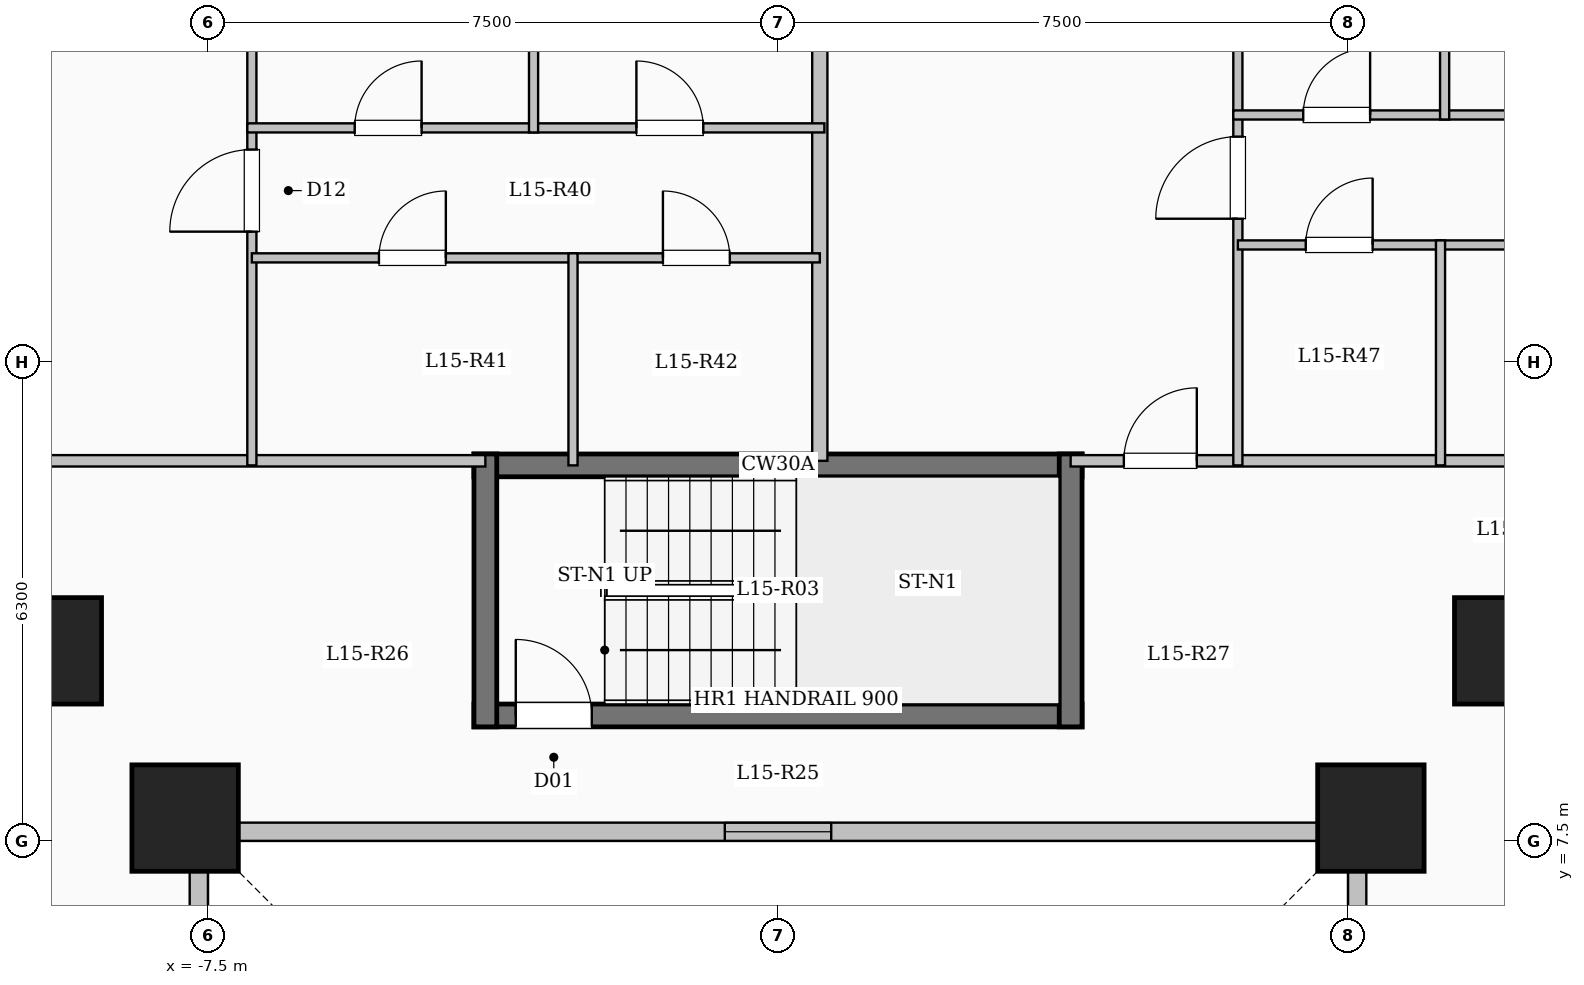
"""IFC4 building model, lengths in metres.
Left out: names, types, materials, properties, quantities, classifications, styles, units other than length and angle.
Written with IfcOpenShell. Run it as: python <this file> out.ifc"""

import sys

from ifc_helpers import new_model, si_unit, direction, frame, frame_2d, origin, origin_2d, place, context, subcontext, project, spatial, rectangle, extrude, element, fill, save


model = new_model("IFC4")
c1 = context("Model", 3, precision=1e-05, world=origin(), true_north=direction((0.0, 1.0)))
c2 = subcontext(c1, "Body", "Model", "MODEL_VIEW")
j1 = project(units=[si_unit("LENGTHUNIT", "METRE"), si_unit("PLANEANGLEUNIT", "RADIAN")], contexts=[c1])
p1 = place(None, origin())
s1 = spatial("IfcSite", under=j1, at=p1, CompositionType="ELEMENT")
p2 = place(p1, origin())
s2 = spatial("IfcBuilding", under=s1, at=p2, CompositionType="ELEMENT")
p3 = place(p2, frame((0.0, 0.0, 57.5)))
s3 = spatial("IfcBuildingStorey", under=s2, at=p3, CompositionType="ELEMENT", Elevation=57.5)
for number, where, z_axis, x_axis in (
    (1, (-7.8, 7.8, 0.0), (0.0, 0.0, 1.0), (1.0, 0.0, 0.0)),
    (2, (7.8, 7.8, 0.0), (0.0, 0.0, 1.0), (1.0, 0.0, 0.0)),
    (3, (-9.6, 10.0, 0.0), (0.0, 0.0, 1.0), (1.0, 0.0, 0.0)),
    (4, (9.6, 10.0, 0.0), (0.0, 0.0, 1.0), (1.0, 0.0, 0.0)),
):
    element("IfcColumn", number, at=place(p3, frame(where, z_axis=z_axis, x_axis=x_axis)), inside=s3, PredefinedType="COLUMN", context=c2, shape_type="SweptSolid", body=[
        extrude(rectangle(XDim=1.4, YDim=1.4, at=origin_2d()), origin(), (0.0, 0.0, 1.0), 3.35),
    ])
p4 = place(p3, frame((7.62, -7.62, 0.0), z_axis=(0.0, 0.0, 1.0), x_axis=(0.0, 1.0, 0.0)))
e5 = element("IfcWall", 5, at=p4, inside=s3, PredefinedType="SOLIDWALL", context=c2, shape_type="SweptSolid", body=[
    extrude(rectangle(XDim=15.24, YDim=0.24, at=frame_2d((7.62, 0.0))), origin(), (0.0, 0.0, 1.0), 3.1),
])
p5 = place(p4, frame((6.92, 0.0, 0.95)))
e6 = element("IfcOpeningElement", 6, at=p5, cuts=e5, PredefinedType="OPENING", context=c2, shape_type="SweptSolid", body=[
    extrude(rectangle(XDim=1.4, YDim=1.5, at=frame_2d((0.7, 0.75))), frame((0.0, 0.13, 0.0), z_axis=(0.0, -1.0, 0.0), x_axis=(1.0, 0.0, 0.0)), (0.0, 0.0, 1.0), 0.26),
])
p6 = place(p3, frame((7.62, 7.62, 0.0), z_axis=(0.0, 0.0, 1.0), x_axis=(-1.0, 0.0, 0.0)))
e7 = element("IfcWall", 7, at=p6, inside=s3, PredefinedType="SOLIDWALL", context=c2, shape_type="SweptSolid", body=[
    extrude(rectangle(XDim=15.24, YDim=0.24, at=frame_2d((7.62, 0.0))), origin(), (0.0, 0.0, 1.0), 3.1),
])
p7 = place(p6, frame((6.92, 0.0, 0.95)))
e8 = element("IfcOpeningElement", 8, at=p7, cuts=e7, PredefinedType="OPENING", context=c2, shape_type="SweptSolid", body=[
    extrude(rectangle(XDim=1.4, YDim=1.5, at=frame_2d((0.7, 0.75))), frame((0.0, 0.13, 0.0), z_axis=(0.0, -1.0, 0.0), x_axis=(1.0, 0.0, 0.0)), (0.0, 0.0, 1.0), 0.26),
])
p8 = place(p3, frame((-7.62, 7.62, 0.0), z_axis=(0.0, 0.0, 1.0), x_axis=(0.0, -1.0, 0.0)))
e9 = element("IfcWall", 9, at=p8, inside=s3, PredefinedType="SOLIDWALL", context=c2, shape_type="SweptSolid", body=[
    extrude(rectangle(XDim=15.24, YDim=0.24, at=frame_2d((7.62, 0.0))), origin(), (0.0, 0.0, 1.0), 3.1),
])
p9 = place(p8, frame((6.92, 0.0, 0.95)))
e10 = element("IfcOpeningElement", 10, at=p9, cuts=e9, PredefinedType="OPENING", context=c2, shape_type="SweptSolid", body=[
    extrude(rectangle(XDim=1.4, YDim=1.5, at=frame_2d((0.7, 0.75))), frame((0.0, 0.13, 0.0), z_axis=(0.0, -1.0, 0.0), x_axis=(1.0, 0.0, 0.0)), (0.0, 0.0, 1.0), 0.26),
])
p10 = place(p3, frame((-4.0, 12.44, 0.0), z_axis=(0.0, 0.0, 1.0), x_axis=(1.0, 0.0, 0.0)))
e11 = element("IfcWall", 11, at=p10, inside=s3, PredefinedType="SHEAR", context=c2, shape_type="SweptSolid", body=[
    extrude(rectangle(XDim=8.0, YDim=0.3, at=frame_2d((4.0, 0.0))), origin(), (0.0, 0.0, 1.0), 3.35),
])
p11 = place(p3, frame((-4.0, 9.15, 0.0), z_axis=(0.0, 0.0, 1.0), x_axis=(1.0, 0.0, 0.0)))
e12 = element("IfcWall", 12, at=p11, inside=s3, PredefinedType="SHEAR", context=c2, shape_type="SweptSolid", body=[
    extrude(rectangle(XDim=8.0, YDim=0.3, at=frame_2d((4.0, 0.0))), origin(), (0.0, 0.0, 1.0), 3.35),
])
p12 = place(p11, frame((0.55, 0.0, 0.0)))
e13 = element("IfcOpeningElement", 13, at=p12, cuts=e12, PredefinedType="OPENING", context=c2, shape_type="SweptSolid", body=[
    extrude(rectangle(XDim=1.0, YDim=2.15, at=frame_2d((0.5, 1.075))), frame((0.0, 0.16, 0.0), z_axis=(0.0, -1.0, 0.0), x_axis=(1.0, 0.0, 0.0)), (0.0, 0.0, 1.0), 0.32),
])
for number, where, z_axis, x_axis in (
    (14, (-3.85, 9.0, 0.0), (0.0, 0.0, 1.0), (0.0, 1.0, 0.0)),
    (15, (3.85, 9.0, 0.0), (0.0, 0.0, 1.0), (0.0, 1.0, 0.0)),
):
    element("IfcWall", number, at=place(p3, frame(where, z_axis=z_axis, x_axis=x_axis)), inside=s3, PredefinedType="SHEAR", context=c2, shape_type="SweptSolid", body=[
        extrude(rectangle(XDim=3.59, YDim=0.3, at=frame_2d((1.795, 0.0))), origin(), (0.0, 0.0, 1.0), 3.35),
    ])
p13 = place(p3, frame((-22.55, 12.5, 0.0), z_axis=(0.0, 0.0, 1.0), x_axis=(1.0, 0.0, 0.0)))
e16 = element("IfcWall", 16, at=p13, inside=s3, PredefinedType="PARTITIONING", context=c2, shape_type="SweptSolid", body=[
    extrude(rectangle(XDim=18.7, YDim=0.15, at=frame_2d((9.35, 0.0))), origin(), (0.0, 0.0, 1.0), 3.1),
])
p14 = place(p13, frame((0.7, 0.0, 0.0)))
e17 = element("IfcOpeningElement", 17, at=p14, cuts=e16, PredefinedType="OPENING", context=c2, shape_type="SweptSolid", body=[
    extrude(rectangle(XDim=0.96, YDim=2.15, at=frame_2d((0.48, 1.075))), frame((0.0, 0.085, 0.0), z_axis=(0.0, -1.0, 0.0), x_axis=(1.0, 0.0, 0.0)), (0.0, 0.0, 1.0), 0.17),
])
p15 = place(p13, frame((11.326, 0.0, 0.0)))
e18 = element("IfcOpeningElement", 18, at=p15, cuts=e16, PredefinedType="OPENING", context=c2, shape_type="SweptSolid", body=[
    extrude(rectangle(XDim=0.96, YDim=2.15, at=frame_2d((0.48, 1.075))), frame((0.0, 0.085, 0.0), z_axis=(0.0, -1.0, 0.0), x_axis=(1.0, 0.0, 0.0)), (0.0, 0.0, 1.0), 0.17),
])
p16 = place(p3, frame((3.85, 12.5, 0.0), z_axis=(0.0, 0.0, 1.0), x_axis=(1.0, 0.0, 0.0)))
e19 = element("IfcWall", 19, at=p16, inside=s3, PredefinedType="PARTITIONING", context=c2, shape_type="SweptSolid", body=[
    extrude(rectangle(XDim=18.7, YDim=0.15, at=frame_2d((9.35, 0.0))), origin(), (0.0, 0.0, 1.0), 3.1),
])
p17 = place(p16, frame((0.7, 0.0, 0.0)))
e20 = element("IfcOpeningElement", 20, at=p17, cuts=e19, PredefinedType="OPENING", context=c2, shape_type="SweptSolid", body=[
    extrude(rectangle(XDim=0.96, YDim=2.15, at=frame_2d((0.48, 1.075))), frame((0.0, 0.085, 0.0), z_axis=(0.0, -1.0, 0.0), x_axis=(1.0, 0.0, 0.0)), (0.0, 0.0, 1.0), 0.17),
])
p18 = place(p16, frame((8.4, 0.0, 0.0)))
e21 = element("IfcOpeningElement", 21, at=p18, cuts=e19, PredefinedType="OPENING", context=c2, shape_type="SweptSolid", body=[
    extrude(rectangle(XDim=0.96, YDim=2.15, at=frame_2d((0.48, 1.075))), frame((0.0, 0.085, 0.0), z_axis=(0.0, -1.0, 0.0), x_axis=(1.0, 0.0, 0.0)), (0.0, 0.0, 1.0), 0.17),
])
p19 = place(p3, frame((0.55, 12.5, 0.0), z_axis=(0.0, 0.0, 1.0), x_axis=(0.0, 1.0, 0.0)))
e22 = element("IfcWall", 22, at=p19, inside=s3, PredefinedType="SOLIDWALL", context=c2, shape_type="SweptSolid", body=[
    extrude(rectangle(XDim=12.58, YDim=0.2, at=frame_2d((6.29, 0.0))), origin(), (0.0, 0.0, 1.0), 3.1),
])
p20 = place(p3, frame((-6.922, 12.44, 0.0), z_axis=(0.0, 0.0, 1.0), x_axis=(0.0, 1.0, 0.0)))
e23 = element("IfcWall", 23, at=p20, inside=s3, PredefinedType="PARTITIONING", context=c2, shape_type="SweptSolid", body=[
    extrude(rectangle(XDim=12.166, YDim=0.12, at=frame_2d((6.083, 0.0))), origin(), (0.0, 0.0, 1.0), 3.1),
])
p21 = place(p20, frame((3.075, 0.0, 0.0)))
e24 = element("IfcOpeningElement", 24, at=p21, cuts=e23, PredefinedType="OPENING", context=c2, shape_type="SweptSolid", body=[
    extrude(rectangle(XDim=1.08, YDim=2.15, at=frame_2d((0.54, 1.075))), frame((0.0, 0.07, 0.0), z_axis=(0.0, -1.0, 0.0), x_axis=(1.0, 0.0, 0.0)), (0.0, 0.0, 1.0), 0.14),
])
p22 = place(p3, frame((-6.922, 15.17, 0.0), z_axis=(0.0, 0.0, 1.0), x_axis=(1.0, 0.0, 0.0)))
e25 = element("IfcWall", 25, at=p22, inside=s3, PredefinedType="PARTITIONING", context=c2, shape_type="SweptSolid", body=[
    extrude(rectangle(XDim=4.225, YDim=0.12, at=frame_2d((2.113, 0.0))), origin(), (0.0, 0.0, 1.0), 3.1),
])
p23 = place(p22, frame((1.672, 0.0, 0.0)))
e26 = element("IfcOpeningElement", 26, at=p23, cuts=e25, PredefinedType="OPENING", context=c2, shape_type="SweptSolid", body=[
    extrude(rectangle(XDim=0.88, YDim=2.1, at=frame_2d((0.44, 1.05))), frame((0.0, 0.07, 0.0), z_axis=(0.0, -1.0, 0.0), x_axis=(1.0, 0.0, 0.0)), (0.0, 0.0, 1.0), 0.14),
])
p24 = place(p3, frame((-2.697, 15.17, 0.0), z_axis=(0.0, 0.0, 1.0), x_axis=(1.0, 0.0, 0.0)))
e27 = element("IfcWall", 27, at=p24, inside=s3, PredefinedType="PARTITIONING", context=c2, shape_type="SweptSolid", body=[
    extrude(rectangle(XDim=3.247, YDim=0.12, at=frame_2d((1.624, 0.0))), origin(), (0.0, 0.0, 1.0), 3.1),
])
p25 = place(p24, frame((1.183, 0.0, 0.0)))
e28 = element("IfcOpeningElement", 28, at=p25, cuts=e27, PredefinedType="OPENING", context=c2, shape_type="SweptSolid", body=[
    extrude(rectangle(XDim=0.88, YDim=2.1, at=frame_2d((0.44, 1.05))), frame((0.0, 0.07, 0.0), z_axis=(0.0, -1.0, 0.0), x_axis=(1.0, 0.0, 0.0)), (0.0, 0.0, 1.0), 0.14),
])
p26 = place(p3, frame((-6.982, 16.88, 0.0), z_axis=(0.0, 0.0, 1.0), x_axis=(1.0, 0.0, 0.0)))
e29 = element("IfcWall", 29, at=p26, inside=s3, PredefinedType="PARTITIONING", context=c2, shape_type="SweptSolid", body=[
    extrude(rectangle(XDim=7.592, YDim=0.12, at=frame_2d((3.796, 0.0))), origin(), (0.0, 0.0, 1.0), 3.1),
])
p27 = place(p26, frame((1.413, 0.0, 0.0)))
e30 = element("IfcOpeningElement", 30, at=p27, cuts=e29, PredefinedType="OPENING", context=c2, shape_type="SweptSolid", body=[
    extrude(rectangle(XDim=0.88, YDim=2.1, at=frame_2d((0.44, 1.05))), frame((0.0, 0.07, 0.0), z_axis=(0.0, -1.0, 0.0), x_axis=(1.0, 0.0, 0.0)), (0.0, 0.0, 1.0), 0.14),
])
p28 = place(p26, frame((5.119, 0.0, 0.0)))
e31 = element("IfcOpeningElement", 31, at=p28, cuts=e29, PredefinedType="OPENING", context=c2, shape_type="SweptSolid", body=[
    extrude(rectangle(XDim=0.88, YDim=2.1, at=frame_2d((0.44, 1.05))), frame((0.0, 0.07, 0.0), z_axis=(0.0, -1.0, 0.0), x_axis=(1.0, 0.0, 0.0)), (0.0, 0.0, 1.0), 0.14),
])
p29 = place(p3, frame((-2.697, 12.44, 0.0), z_axis=(0.0, 0.0, 1.0), x_axis=(0.0, 1.0, 0.0)))
e32 = element("IfcWall", 32, at=p29, inside=s3, PredefinedType="PARTITIONING", context=c2, shape_type="SweptSolid", body=[
    extrude(rectangle(XDim=2.79, YDim=0.12, at=frame_2d((1.395, 0.0))), origin(), (0.0, 0.0, 1.0), 3.1),
])
p30 = place(p3, frame((-3.216, 16.82, 0.0), z_axis=(0.0, 0.0, 1.0), x_axis=(0.0, 1.0, 0.0)))
e33 = element("IfcWall", 33, at=p30, inside=s3, PredefinedType="PARTITIONING", context=c2, shape_type="SweptSolid", body=[
    extrude(rectangle(XDim=8.26, YDim=0.12, at=frame_2d((4.13, 0.0))), origin(), (0.0, 0.0, 1.0), 3.1),
])
p31 = place(p3, frame((6.05, 12.44, 0.0), z_axis=(0.0, 0.0, 1.0), x_axis=(0.0, 1.0, 0.0)))
e34 = element("IfcWall", 34, at=p31, inside=s3, PredefinedType="PARTITIONING", context=c2, shape_type="SweptSolid", body=[
    extrude(rectangle(XDim=12.381, YDim=0.12, at=frame_2d((6.19, 0.0))), origin(), (0.0, 0.0, 1.0), 3.1),
])
p32 = place(p31, frame((3.245, 0.0, 0.0)))
e35 = element("IfcOpeningElement", 35, at=p32, cuts=e34, PredefinedType="OPENING", context=c2, shape_type="SweptSolid", body=[
    extrude(rectangle(XDim=1.08, YDim=2.15, at=frame_2d((0.54, 1.075))), frame((0.0, 0.07, 0.0), z_axis=(0.0, -1.0, 0.0), x_axis=(1.0, 0.0, 0.0)), (0.0, 0.0, 1.0), 0.14),
])
p33 = place(p3, frame((6.05, 15.34, 0.0), z_axis=(0.0, 0.0, 1.0), x_axis=(1.0, 0.0, 0.0)))
e36 = element("IfcWall", 36, at=p33, inside=s3, PredefinedType="PARTITIONING", context=c2, shape_type="SweptSolid", body=[
    extrude(rectangle(XDim=2.666, YDim=0.12, at=frame_2d((1.333, 0.0))), origin(), (0.0, 0.0, 1.0), 3.1),
])
p34 = place(p33, frame((0.893, 0.0, 0.0)))
e37 = element("IfcOpeningElement", 37, at=p34, cuts=e36, PredefinedType="OPENING", context=c2, shape_type="SweptSolid", body=[
    extrude(rectangle(XDim=0.88, YDim=2.1, at=frame_2d((0.44, 1.05))), frame((0.0, 0.07, 0.0), z_axis=(0.0, -1.0, 0.0), x_axis=(1.0, 0.0, 0.0)), (0.0, 0.0, 1.0), 0.14),
])
p35 = place(p3, frame((8.716, 15.34, 0.0), z_axis=(0.0, 0.0, 1.0), x_axis=(1.0, 0.0, 0.0)))
e38 = element("IfcWall", 38, at=p35, inside=s3, PredefinedType="PARTITIONING", context=c2, shape_type="SweptSolid", body=[
    extrude(rectangle(XDim=2.834, YDim=0.12, at=frame_2d((1.417, 0.0))), origin(), (0.0, 0.0, 1.0), 3.1),
])
p36 = place(p35, frame((0.977, 0.0, 0.0)))
e39 = element("IfcOpeningElement", 39, at=p36, cuts=e38, PredefinedType="OPENING", context=c2, shape_type="SweptSolid", body=[
    extrude(rectangle(XDim=0.88, YDim=2.1, at=frame_2d((0.44, 1.05))), frame((0.0, 0.07, 0.0), z_axis=(0.0, -1.0, 0.0), x_axis=(1.0, 0.0, 0.0)), (0.0, 0.0, 1.0), 0.14),
])
p37 = place(p3, frame((5.99, 17.05, 0.0), z_axis=(0.0, 0.0, 1.0), x_axis=(1.0, 0.0, 0.0)))
e40 = element("IfcWall", 40, at=p37, inside=s3, PredefinedType="PARTITIONING", context=c2, shape_type="SweptSolid", body=[
    extrude(rectangle(XDim=5.62, YDim=0.12, at=frame_2d((2.81, 0.0))), origin(), (0.0, 0.0, 1.0), 3.1),
])
p38 = place(p37, frame((0.92, 0.0, 0.0)))
e41 = element("IfcOpeningElement", 41, at=p38, cuts=e40, PredefinedType="OPENING", context=c2, shape_type="SweptSolid", body=[
    extrude(rectangle(XDim=0.88, YDim=2.1, at=frame_2d((0.44, 1.05))), frame((0.0, 0.07, 0.0), z_axis=(0.0, -1.0, 0.0), x_axis=(1.0, 0.0, 0.0)), (0.0, 0.0, 1.0), 0.14),
])
p39 = place(p37, frame((3.64, 0.0, 0.0)))
e42 = element("IfcOpeningElement", 42, at=p39, cuts=e40, PredefinedType="OPENING", context=c2, shape_type="SweptSolid", body=[
    extrude(rectangle(XDim=0.88, YDim=2.1, at=frame_2d((0.44, 1.05))), frame((0.0, 0.07, 0.0), z_axis=(0.0, -1.0, 0.0), x_axis=(1.0, 0.0, 0.0)), (0.0, 0.0, 1.0), 0.14),
])
p40 = place(p3, frame((8.716, 12.44, 0.0), z_axis=(0.0, 0.0, 1.0), x_axis=(0.0, 1.0, 0.0)))
e43 = element("IfcWall", 43, at=p40, inside=s3, PredefinedType="PARTITIONING", context=c2, shape_type="SweptSolid", body=[
    extrude(rectangle(XDim=2.96, YDim=0.12, at=frame_2d((1.48, 0.0))), origin(), (0.0, 0.0, 1.0), 3.1),
])
p41 = place(p3, frame((8.77, 16.99, 0.0), z_axis=(0.0, 0.0, 1.0), x_axis=(0.0, 1.0, 0.0)))
e44 = element("IfcWall", 44, at=p41, inside=s3, PredefinedType="PARTITIONING", context=c2, shape_type="SweptSolid", body=[
    extrude(rectangle(XDim=7.16, YDim=0.12, at=frame_2d((3.58, 0.0))), origin(), (0.0, 0.0, 1.0), 3.1),
])
p42 = place(p7, origin())
e45 = element("IfcWindow", 45, at=p42, inside=s3, PartitioningType="SINGLE_PANEL", PredefinedType="WINDOW", context=c2, shape_type="SweptSolid", body=[
    extrude(rectangle(XDim=1.4, YDim=1.5, at=frame_2d((0.7, 0.75))), frame((0.0, 0.03, 0.0), z_axis=(0.0, -1.0, 0.0), x_axis=(1.0, 0.0, 0.0)), (0.0, 0.0, 1.0), 0.06),
])
fill(e8, e45)
p43 = place(p12, origin())
e46 = element("IfcDoor", 46, at=p43, inside=s3, OperationType="SINGLE_SWING_LEFT", PredefinedType="DOOR", context=c2, shape_type="SweptSolid", body=[
    extrude(rectangle(XDim=1.0, YDim=2.15, at=frame_2d((0.5, 1.075))), frame((0.0, 0.025, 0.0), z_axis=(0.0, -1.0, 0.0), x_axis=(1.0, 0.0, 0.0)), (0.0, 0.0, 1.0), 0.05),
])
fill(e13, e46)
p44 = place(p21, origin())
e47 = element("IfcDoor", 47, at=p44, inside=s3, OperationType="SINGLE_SWING_LEFT", PredefinedType="DOOR", context=c2, shape_type="SweptSolid", body=[
    extrude(rectangle(XDim=1.08, YDim=2.15, at=frame_2d((0.54, 1.075))), frame((0.0, 0.025, 0.0), z_axis=(0.0, -1.0, 0.0), x_axis=(1.0, 0.0, 0.0)), (0.0, 0.0, 1.0), 0.05),
])
fill(e24, e47)
p45 = place(p23, origin())
e48 = element("IfcDoor", 48, at=p45, inside=s3, OperationType="SINGLE_SWING_RIGHT", PredefinedType="DOOR", context=c2, shape_type="SweptSolid", body=[
    extrude(rectangle(XDim=0.88, YDim=2.1, at=frame_2d((0.44, 1.05))), frame((0.0, 0.025, 0.0), z_axis=(0.0, -1.0, 0.0), x_axis=(1.0, 0.0, 0.0)), (0.0, 0.0, 1.0), 0.05),
])
fill(e26, e48)
p46 = place(p25, origin())
e49 = element("IfcDoor", 49, at=p46, inside=s3, OperationType="SINGLE_SWING_LEFT", PredefinedType="DOOR", context=c2, shape_type="SweptSolid", body=[
    extrude(rectangle(XDim=0.88, YDim=2.1, at=frame_2d((0.44, 1.05))), frame((0.0, 0.025, 0.0), z_axis=(0.0, -1.0, 0.0), x_axis=(1.0, 0.0, 0.0)), (0.0, 0.0, 1.0), 0.05),
])
fill(e28, e49)
p47 = place(p27, origin())
e50 = element("IfcDoor", 50, at=p47, inside=s3, OperationType="SINGLE_SWING_RIGHT", PredefinedType="DOOR", context=c2, shape_type="SweptSolid", body=[
    extrude(rectangle(XDim=0.88, YDim=2.1, at=frame_2d((0.44, 1.05))), frame((0.0, 0.025, 0.0), z_axis=(0.0, -1.0, 0.0), x_axis=(1.0, 0.0, 0.0)), (0.0, 0.0, 1.0), 0.05),
])
fill(e30, e50)
p48 = place(p28, origin())
e51 = element("IfcDoor", 51, at=p48, inside=s3, OperationType="SINGLE_SWING_LEFT", PredefinedType="DOOR", context=c2, shape_type="SweptSolid", body=[
    extrude(rectangle(XDim=0.88, YDim=2.1, at=frame_2d((0.44, 1.05))), frame((0.0, 0.025, 0.0), z_axis=(0.0, -1.0, 0.0), x_axis=(1.0, 0.0, 0.0)), (0.0, 0.0, 1.0), 0.05),
])
fill(e31, e51)
p49 = place(p17, origin())
e52 = element("IfcDoor", 52, at=p49, inside=s3, OperationType="SINGLE_SWING_RIGHT", PredefinedType="DOOR", context=c2, shape_type="SweptSolid", body=[
    extrude(rectangle(XDim=0.96, YDim=2.15, at=frame_2d((0.48, 1.075))), frame((0.0, 0.025, 0.0), z_axis=(0.0, -1.0, 0.0), x_axis=(1.0, 0.0, 0.0)), (0.0, 0.0, 1.0), 0.05),
])
fill(e20, e52)
p50 = place(p32, origin())
e53 = element("IfcDoor", 53, at=p50, inside=s3, OperationType="SINGLE_SWING_LEFT", PredefinedType="DOOR", context=c2, shape_type="SweptSolid", body=[
    extrude(rectangle(XDim=1.08, YDim=2.15, at=frame_2d((0.54, 1.075))), frame((0.0, 0.025, 0.0), z_axis=(0.0, -1.0, 0.0), x_axis=(1.0, 0.0, 0.0)), (0.0, 0.0, 1.0), 0.05),
])
fill(e35, e53)
p51 = place(p34, origin())
e54 = element("IfcDoor", 54, at=p51, inside=s3, OperationType="SINGLE_SWING_RIGHT", PredefinedType="DOOR", context=c2, shape_type="SweptSolid", body=[
    extrude(rectangle(XDim=0.88, YDim=2.1, at=frame_2d((0.44, 1.05))), frame((0.0, 0.025, 0.0), z_axis=(0.0, -1.0, 0.0), x_axis=(1.0, 0.0, 0.0)), (0.0, 0.0, 1.0), 0.05),
])
fill(e37, e54)
p52 = place(p38, origin())
e55 = element("IfcDoor", 55, at=p52, inside=s3, OperationType="SINGLE_SWING_RIGHT", PredefinedType="DOOR", context=c2, shape_type="SweptSolid", body=[
    extrude(rectangle(XDim=0.88, YDim=2.1, at=frame_2d((0.44, 1.05))), frame((0.0, 0.025, 0.0), z_axis=(0.0, -1.0, 0.0), x_axis=(1.0, 0.0, 0.0)), (0.0, 0.0, 1.0), 0.05),
])
fill(e41, e55)
save(model, sys.argv[1])
